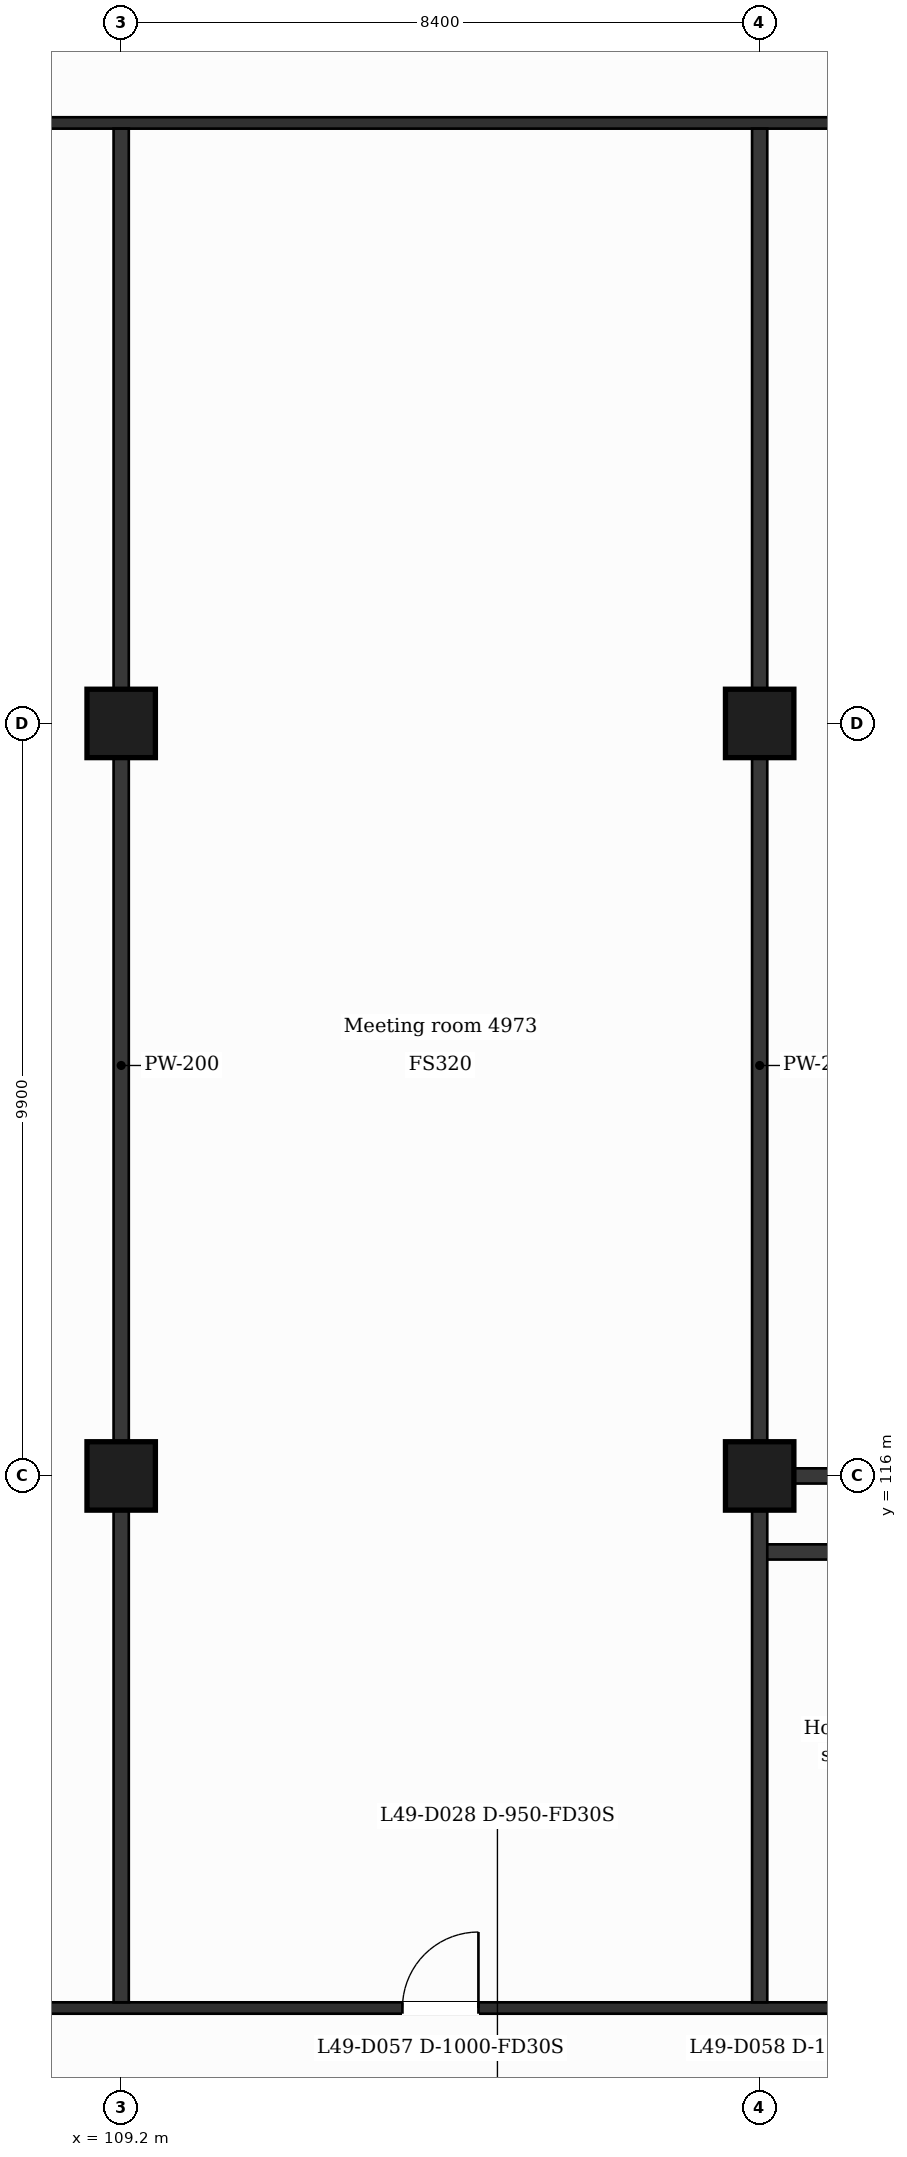
"""IFC4 building model, lengths in metres.
Left out: names, types, materials, properties, quantities, classifications, styles, units other than length and angle.
Written with IfcOpenShell. Run it as: python <this file> out.ifc"""

import sys

from ifc_helpers import new_model, si_unit, direction, frame, frame_2d, origin, origin_2d, place, context, subcontext, project, spatial, rectangle, extrude, element, fill, save


model = new_model("IFC4")
c1 = context("Model", 3, precision=1e-05, world=origin(), true_north=direction((0.0, 1.0)))
c2 = subcontext(c1, "Body", "Model", "MODEL_VIEW")
j1 = project(units=[si_unit("LENGTHUNIT", "METRE"), si_unit("PLANEANGLEUNIT", "RADIAN")], contexts=[c1])
p1 = place(None, origin())
s1 = spatial("IfcSite", under=j1, at=p1, CompositionType="ELEMENT")
p2 = place(p1, origin())
s2 = spatial("IfcBuilding", under=s1, at=p2, CompositionType="ELEMENT")
p3 = place(p2, frame((0.0, 0.0, 205.9)))
s3 = spatial("IfcBuildingStorey", under=s2, at=p3, CompositionType="ELEMENT", Elevation=205.9)
for number, where, z_axis, x_axis in (
    (1, (109.2, 116.0, 0.0), (0.0, 0.0, 1.0), (1.0, 0.0, 0.0)),
    (2, (117.6, 116.0, 0.0), (0.0, 0.0, 1.0), (1.0, 0.0, 0.0)),
    (3, (109.2, 125.9, 0.0), (0.0, 0.0, 1.0), (1.0, 0.0, 0.0)),
    (4, (117.6, 125.9, 0.0), (0.0, 0.0, 1.0), (1.0, 0.0, 0.0)),
):
    element("IfcColumn", number, at=place(p3, frame(where, z_axis=z_axis, x_axis=x_axis)), inside=s3, PredefinedType="COLUMN", context=c2, shape_type="SweptSolid", body=[
        extrude(rectangle(XDim=0.9, YDim=0.9, at=origin_2d()), origin(), (0.0, 0.0, 1.0), 3.7),
    ])
p4 = place(p3, frame((100.725, 109.0, 0.0), z_axis=(0.0, 0.0, 1.0), x_axis=(1.0, 0.0, 0.0)))
e5 = element("IfcWall", 5, at=p4, inside=s3, PredefinedType="PARTITIONING", context=c2, shape_type="SweptSolid", body=[
    extrude(rectangle(XDim=25.35, YDim=0.15, at=frame_2d((12.675, 0.0))), origin(), (0.0, 0.0, 1.0), 3.38),
])
p5 = place(p4, frame((20.55, 0.0, 0.0)))
e6 = element("IfcOpeningElement", 6, at=p5, cuts=e5, PredefinedType="OPENING", context=c2, shape_type="SweptSolid", body=[
    extrude(rectangle(XDim=1.0, YDim=2.1, at=frame_2d((0.5, 1.05))), frame((0.0, 0.085, 0.0), z_axis=(0.0, -1.0, 0.0), x_axis=(1.0, 0.0, 0.0)), (0.0, 0.0, 1.0), 0.17),
])
p6 = place(p4, frame((5.405, 0.0, 0.0)))
e7 = element("IfcOpeningElement", 7, at=p6, cuts=e5, PredefinedType="OPENING", context=c2, shape_type="SweptSolid", body=[
    extrude(rectangle(XDim=1.0, YDim=2.1, at=frame_2d((0.5, 1.05))), frame((0.0, 0.085, 0.0), z_axis=(0.0, -1.0, 0.0), x_axis=(1.0, 0.0, 0.0)), (0.0, 0.0, 1.0), 0.17),
])
p7 = place(p4, frame((12.175, 0.0, 0.0)))
e8 = element("IfcOpeningElement", 8, at=p7, cuts=e5, PredefinedType="OPENING", context=c2, shape_type="SweptSolid", body=[
    extrude(rectangle(XDim=1.0, YDim=2.1, at=frame_2d((0.5, 1.05))), frame((0.0, 0.085, 0.0), z_axis=(0.0, -1.0, 0.0), x_axis=(1.0, 0.0, 0.0)), (0.0, 0.0, 1.0), 0.17),
])
p8 = place(p4, frame((17.875, 0.0, 0.0)))
e9 = element("IfcOpeningElement", 9, at=p8, cuts=e5, PredefinedType="OPENING", context=c2, shape_type="SweptSolid", body=[
    extrude(rectangle(XDim=1.0, YDim=2.1, at=frame_2d((0.5, 1.05))), frame((0.0, 0.085, 0.0), z_axis=(0.0, -1.0, 0.0), x_axis=(1.0, 0.0, 0.0)), (0.0, 0.0, 1.0), 0.17),
])
p9 = place(p3, frame((117.6, 115.0, 0.0), z_axis=(0.0, 0.0, 1.0), x_axis=(1.0, 0.0, 0.0)))
e10 = element("IfcWall", 10, at=p9, inside=s3, PredefinedType="PARTITIONING", context=c2, shape_type="SweptSolid", body=[
    extrude(rectangle(XDim=3.1, YDim=0.2, at=frame_2d((1.55, 0.0))), origin(), (0.0, 0.0, 1.0), 3.38),
])
p10 = place(p3, frame((117.6, 116.0, 0.0), z_axis=(0.0, 0.0, 1.0), x_axis=(1.0, 0.0, 0.0)))
e11 = element("IfcWall", 11, at=p10, inside=s3, PredefinedType="PARTITIONING", context=c2, shape_type="SweptSolid", body=[
    extrude(rectangle(XDim=6.0, YDim=0.2, at=frame_2d((3.0, 0.0))), origin(), (0.0, 0.0, 1.0), 3.38),
])
p11 = place(p3, frame((100.725, 133.8, 0.0), z_axis=(0.0, 0.0, 1.0), x_axis=(1.0, 0.0, 0.0)))
e12 = element("IfcWall", 12, at=p11, inside=s3, PredefinedType="PARTITIONING", context=c2, shape_type="SweptSolid", body=[
    extrude(rectangle(XDim=25.35, YDim=0.15, at=frame_2d((12.675, 0.0))), origin(), (0.0, 0.0, 1.0), 3.38),
])
p12 = place(p11, frame((19.375, 0.0, 0.0)))
e13 = element("IfcOpeningElement", 13, at=p12, cuts=e12, PredefinedType="OPENING", context=c2, shape_type="SweptSolid", body=[
    extrude(rectangle(XDim=1.0, YDim=2.1, at=frame_2d((0.5, 1.05))), frame((0.0, 0.085, 0.0), z_axis=(0.0, -1.0, 0.0), x_axis=(1.0, 0.0, 0.0)), (0.0, 0.0, 1.0), 0.17),
])
for number, where, z_axis, x_axis in (
    (14, (109.2, 109.075, 0.0), (0.0, 0.0, 1.0), (0.0, 1.0, 0.0)),
    (15, (117.6, 109.075, 0.0), (0.0, 0.0, 1.0), (0.0, 1.0, 0.0)),
):
    element("IfcWall", number, at=place(p3, frame(where, z_axis=z_axis, x_axis=x_axis)), inside=s3, PredefinedType="PARTITIONING", context=c2, shape_type="SweptSolid", body=[
        extrude(rectangle(XDim=24.65, YDim=0.2, at=frame_2d((12.325, 0.0))), origin(), (0.0, 0.0, 1.0), 3.38),
    ])
p13 = place(p7, origin())
e16 = element("IfcDoor", 16, at=p13, inside=s3, OperationType="SINGLE_SWING_RIGHT", PredefinedType="DOOR", context=c2, shape_type="SweptSolid", body=[
    extrude(rectangle(XDim=1.0, YDim=2.1, at=frame_2d((0.5, 1.05))), frame((0.0, 0.025, 0.0), z_axis=(0.0, -1.0, 0.0), x_axis=(1.0, 0.0, 0.0)), (0.0, 0.0, 1.0), 0.05),
])
fill(e8, e16)
save(model, sys.argv[1])
